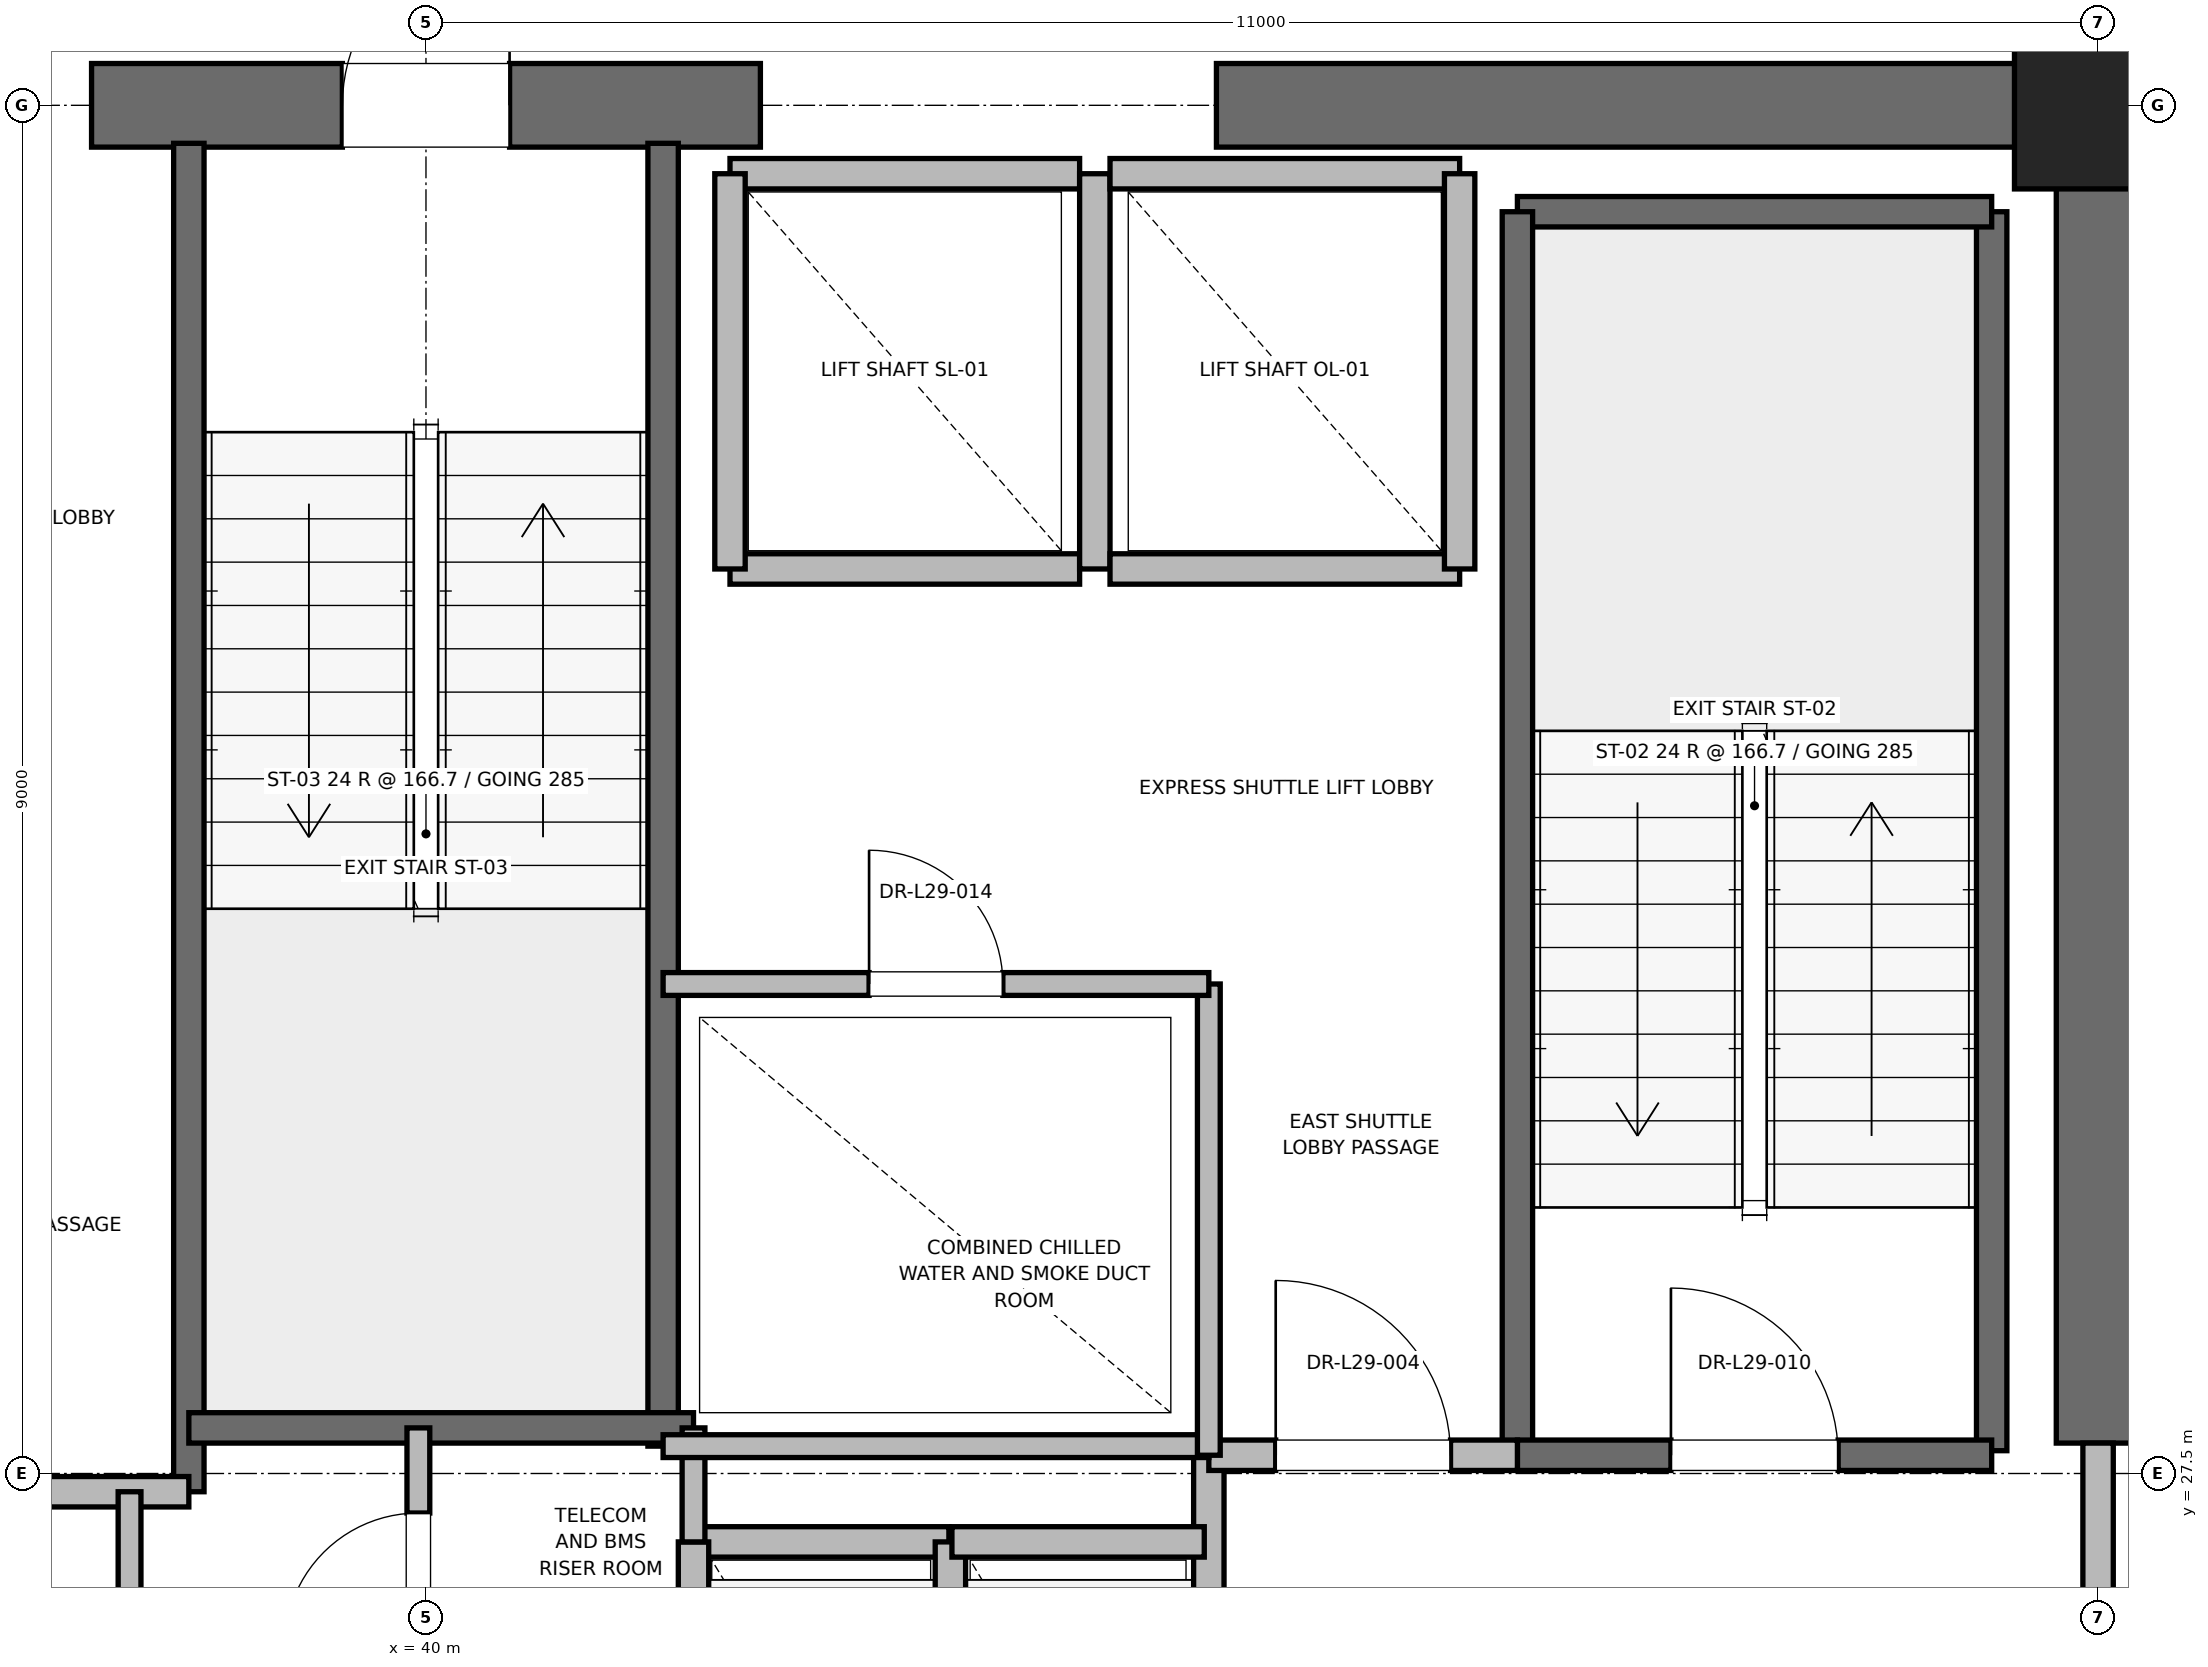
"""IFC4 building model, lengths in metres.
Left out: names, types, materials, properties, quantities, classifications, styles, units other than length and angle.
Written with IfcOpenShell. Run it as: python <this file> out.ifc"""

import sys

from ifc_helpers import new_model, si_unit, direction, frame, frame_2d, origin, origin_2d, place, context, subcontext, project, spatial, rectangle, extrude, element, fill, save


model = new_model("IFC4")
c1 = context("Model", 3, precision=1e-05, world=origin(), true_north=direction((0.0, 1.0)))
c2 = subcontext(c1, "Body", "Model", "MODEL_VIEW")
j1 = project(units=[si_unit("LENGTHUNIT", "METRE"), si_unit("PLANEANGLEUNIT", "RADIAN")], contexts=[c1])
p1 = place(None, origin())
s1 = spatial("IfcSite", under=j1, at=p1, CompositionType="ELEMENT")
p2 = place(p1, origin())
s2 = spatial("IfcBuilding", under=s1, at=p2, CompositionType="ELEMENT")
p3 = place(p2, frame((0.0, 0.0, 128.4)))
s3 = spatial("IfcBuildingStorey", under=s2, at=p3, CompositionType="ELEMENT", Elevation=128.4)
p4 = place(p3, frame((51.0, 36.5, 0.0), z_axis=(0.0, 0.0, 1.0), x_axis=(1.0, 0.0, 0.0)))
e1 = element("IfcColumn", 1, at=p4, inside=s3, PredefinedType="PILASTER", context=c2, shape_type="SweptSolid", body=[
    extrude(rectangle(XDim=1.1, YDim=1.1, at=origin_2d()), origin(), (0.0, 0.0, 1.0), 4.0),
])
p5 = place(p3, frame((37.8, 36.5, 0.0), z_axis=(0.0, 0.0, 1.0), x_axis=(1.0, 0.0, 0.0)))
e2 = element("IfcWall", 2, at=p5, inside=s3, PredefinedType="SHEAR", context=c2, shape_type="SweptSolid", body=[
    extrude(rectangle(XDim=4.4, YDim=0.55, at=frame_2d((2.2, 0.0))), origin(), (0.0, 0.0, 1.0), 3.775),
])
p6 = place(p5, frame((1.65, 0.0, 0.0)))
e3 = element("IfcOpeningElement", 3, at=p6, cuts=e2, PredefinedType="OPENING", context=c2, shape_type="SweptSolid", body=[
    extrude(rectangle(XDim=1.1, YDim=2.15, at=frame_2d((0.55, 1.075))), frame((0.0, 0.275, 0.0), z_axis=(0.0, -1.0, 0.0), x_axis=(1.0, 0.0, 0.0)), (0.0, 0.0, 1.0), 0.55),
])
p7 = place(p3, frame((45.2, 36.5, 0.0), z_axis=(0.0, 0.0, 1.0), x_axis=(1.0, 0.0, 0.0)))
e4 = element("IfcWall", 4, at=p7, inside=s3, PredefinedType="SHEAR", context=c2, shape_type="SweptSolid", body=[
    extrude(rectangle(XDim=5.8, YDim=0.55, at=frame_2d((2.9, 0.0))), origin(), (0.0, 0.0, 1.0), 3.775),
])
p8 = place(p3, frame((51.0, 27.7, 0.0), z_axis=(0.0, 0.0, 1.0), x_axis=(0.0, 1.0, 0.0)))
e5 = element("IfcWall", 5, at=p8, inside=s3, PredefinedType="SHEAR", context=c2, shape_type="SweptSolid", body=[
    extrude(rectangle(XDim=8.8, YDim=0.55, at=frame_2d((4.4, 0.0))), origin(), (0.0, 0.0, 1.0), 3.775),
])
p9 = place(p3, frame((50.3, 27.65, 0.0), z_axis=(0.0, 0.0, 1.0), x_axis=(0.0, 1.0, 0.0)))
e6 = element("IfcWall", 6, at=p9, inside=s3, PredefinedType="SOLIDWALL", context=c2, shape_type="SweptSolid", body=[
    extrude(rectangle(XDim=8.15, YDim=0.2, at=frame_2d((4.075, 0.0))), origin(), (0.0, 0.0, 1.0), 3.775),
])
p10 = place(p3, frame((47.18, 35.8, 0.0), z_axis=(0.0, 0.0, 1.0), x_axis=(1.0, 0.0, 0.0)))
e7 = element("IfcWall", 7, at=p10, inside=s3, PredefinedType="SOLIDWALL", context=c2, shape_type="SweptSolid", body=[
    extrude(rectangle(XDim=3.12, YDim=0.2, at=frame_2d((1.56, 0.0))), origin(), (0.0, 0.0, 1.0), 3.775),
])
p11 = place(p3, frame((47.18, 27.62, 0.0), z_axis=(0.0, 0.0, 1.0), x_axis=(0.0, 1.0, 0.0)))
e8 = element("IfcWall", 8, at=p11, inside=s3, PredefinedType="SOLIDWALL", context=c2, shape_type="SweptSolid", body=[
    extrude(rectangle(XDim=8.18, YDim=0.2, at=frame_2d((4.09, 0.0))), origin(), (0.0, 0.0, 1.0), 3.775),
])
p12 = place(p3, frame((47.18, 27.62, 0.0), z_axis=(0.0, 0.0, 1.0), x_axis=(1.0, 0.0, 0.0)))
e9 = element("IfcWall", 9, at=p12, inside=s3, PredefinedType="SOLIDWALL", context=c2, shape_type="SweptSolid", body=[
    extrude(rectangle(XDim=3.12, YDim=0.2, at=frame_2d((1.56, 0.0))), origin(), (0.0, 0.0, 1.0), 3.775),
])
p13 = place(p12, frame((1.01, 0.0, 0.0)))
e10 = element("IfcOpeningElement", 10, at=p13, cuts=e9, PredefinedType="OPENING", context=c2, shape_type="SweptSolid", body=[
    extrude(rectangle(XDim=1.1, YDim=2.15, at=frame_2d((0.55, 1.075))), frame((0.0, 0.1, 0.0), z_axis=(0.0, -1.0, 0.0), x_axis=(1.0, 0.0, 0.0)), (0.0, 0.0, 1.0), 0.2),
])
p14 = place(p3, frame((38.44, 27.38, 0.0), z_axis=(0.0, 0.0, 1.0), x_axis=(0.0, 1.0, 0.0)))
e11 = element("IfcWall", 11, at=p14, inside=s3, PredefinedType="SOLIDWALL", context=c2, shape_type="SweptSolid", body=[
    extrude(rectangle(XDim=8.87, YDim=0.2, at=frame_2d((4.435, 0.0))), origin(), (0.0, 0.0, 1.0), 3.775),
])
p15 = place(p3, frame((41.56, 27.68, 0.0), z_axis=(0.0, 0.0, 1.0), x_axis=(0.0, 1.0, 0.0)))
e12 = element("IfcWall", 12, at=p15, inside=s3, PredefinedType="SOLIDWALL", context=c2, shape_type="SweptSolid", body=[
    extrude(rectangle(XDim=8.57, YDim=0.2, at=frame_2d((4.285, 0.0))), origin(), (0.0, 0.0, 1.0), 3.775),
])
p16 = place(p3, frame((38.44, 27.8, 0.0), z_axis=(0.0, 0.0, 1.0), x_axis=(1.0, 0.0, 0.0)))
e13 = element("IfcWall", 13, at=p16, inside=s3, PredefinedType="SOLIDWALL", context=c2, shape_type="SweptSolid", body=[
    extrude(rectangle(XDim=3.32, YDim=0.2, at=frame_2d((1.66, 0.0))), origin(), (0.0, 0.0, 1.0), 3.775),
])
p17 = place(p3, frame((32.82, 27.38, 0.0), z_axis=(0.0, 0.0, 1.0), x_axis=(1.0, 0.0, 0.0)))
e14 = element("IfcWall", 14, at=p17, inside=s3, PredefinedType="PARTITIONING", context=c2, shape_type="SweptSolid", body=[
    extrude(rectangle(XDim=5.62, YDim=0.2, at=frame_2d((2.81, 0.0))), origin(), (0.0, 0.0, 1.0), 3.775),
])
p18 = place(p3, frame((45.15, 24.25, 0.0), z_axis=(0.0, 0.0, 1.0), x_axis=(0.0, 1.0, 0.0)))
e15 = element("IfcWall", 15, at=p18, inside=s3, PredefinedType="PARTITIONING", context=c2, shape_type="SweptSolid", body=[
    extrude(rectangle(XDim=3.37, YDim=0.2, at=frame_2d((1.685, 0.0))), origin(), (0.0, 0.0, 1.0), 3.775),
])
p19 = place(p3, frame((45.15, 27.62, 0.0), z_axis=(0.0, 0.0, 1.0), x_axis=(1.0, 0.0, 0.0)))
e16 = element("IfcWall", 16, at=p19, inside=s3, PredefinedType="PARTITIONING", context=c2, shape_type="SweptSolid", body=[
    extrude(rectangle(XDim=2.03, YDim=0.2, at=frame_2d((1.015, 0.0))), origin(), (0.0, 0.0, 1.0), 3.775),
])
p20 = place(p19, frame((0.44, 0.0, 0.0)))
e17 = element("IfcOpeningElement", 17, at=p20, cuts=e16, PredefinedType="OPENING", context=c2, shape_type="SweptSolid", body=[
    extrude(rectangle(XDim=1.15, YDim=2.2, at=frame_2d((0.575, 1.1))), frame((0.0, 0.1, 0.0), z_axis=(0.0, -1.0, 0.0), x_axis=(1.0, 0.0, 0.0)), (0.0, 0.0, 1.0), 0.2),
])
p21 = place(p3, frame((51.0, 24.3, 0.0), z_axis=(0.0, 0.0, 1.0), x_axis=(0.0, 1.0, 0.0)))
e18 = element("IfcWall", 18, at=p21, inside=s3, PredefinedType="PARTITIONING", context=c2, shape_type="SweptSolid", body=[
    extrude(rectangle(XDim=3.4, YDim=0.2, at=frame_2d((1.7, 0.0))), origin(), (0.0, 0.0, 1.0), 2.755),
])
p22 = place(p21, frame((1.125, 0.0, 0.0)))
e19 = element("IfcOpeningElement", 19, at=p22, cuts=e18, PredefinedType="OPENING", context=c2, shape_type="SweptSolid", body=[
    extrude(rectangle(XDim=1.15, YDim=2.2, at=frame_2d((0.575, 1.1))), frame((0.0, 0.1, 0.0), z_axis=(0.0, -1.0, 0.0), x_axis=(1.0, 0.0, 0.0)), (0.0, 0.0, 1.0), 0.2),
])
p23 = place(p3, frame((43.44, 27.05, 0.0), z_axis=(0.0, 0.0, 1.0), x_axis=(-1.0, 0.0, 0.0)))
e20 = element("IfcWall", 20, at=p23, inside=s3, PredefinedType="SOLIDWALL", context=c2, shape_type="SweptSolid", body=[
    extrude(rectangle(XDim=1.68, YDim=0.2, at=frame_2d((0.84, 0.0))), origin(), (0.0, 0.0, 1.0), 3.775),
])
for number, where, z_axis, x_axis in (
    (21, (41.76, 27.05, 0.0), (0.0, 0.0, 1.0), (0.0, -1.0, 0.0)),
    (22, (43.45, 24.45, 0.0), (0.0, 0.0, 1.0), (0.0, 1.0, 0.0)),
):
    element("IfcWall", number, at=place(p3, frame(where, z_axis=z_axis, x_axis=x_axis)), inside=s3, PredefinedType="SOLIDWALL", context=c2, shape_type="SweptSolid", body=[
        extrude(rectangle(XDim=2.6, YDim=0.2, at=frame_2d((1.3, 0.0))), origin(), (0.0, 0.0, 1.0), 3.775),
    ])
p24 = place(p3, frame((45.12, 27.05, 0.0), z_axis=(0.0, 0.0, 1.0), x_axis=(-1.0, 0.0, 0.0)))
e23 = element("IfcWall", 23, at=p24, inside=s3, PredefinedType="SOLIDWALL", context=c2, shape_type="SweptSolid", body=[
    extrude(rectangle(XDim=1.66, YDim=0.2, at=frame_2d((0.83, 0.0))), origin(), (0.0, 0.0, 1.0), 3.775),
])
p25 = place(p3, frame((42.0, 33.45, 0.0), z_axis=(0.0, 0.0, 1.0), x_axis=(1.0, 0.0, 0.0)))
e24 = element("IfcWall", 24, at=p25, inside=s3, PredefinedType="SOLIDWALL", context=c2, shape_type="SweptSolid", body=[
    extrude(rectangle(XDim=2.3, YDim=0.2, at=frame_2d((1.15, 0.0))), origin(), (0.0, 0.0, 1.0), 3.775),
])
p26 = place(p3, frame((44.3, 36.05, 0.0), z_axis=(0.0, 0.0, 1.0), x_axis=(-1.0, 0.0, 0.0)))
e25 = element("IfcWall", 25, at=p26, inside=s3, PredefinedType="SOLIDWALL", context=c2, shape_type="SweptSolid", body=[
    extrude(rectangle(XDim=2.3, YDim=0.2, at=frame_2d((1.15, 0.0))), origin(), (0.0, 0.0, 1.0), 2.755),
])
for number, where, z_axis, x_axis in (
    (26, (42.0, 36.05, 0.0), (0.0, 0.0, 1.0), (0.0, -1.0, 0.0)),
    (27, (44.4, 33.45, 0.0), (0.0, 0.0, 1.0), (0.0, 1.0, 0.0)),
):
    element("IfcWall", number, at=place(p3, frame(where, z_axis=z_axis, x_axis=x_axis)), inside=s3, PredefinedType="SOLIDWALL", context=c2, shape_type="SweptSolid", body=[
        extrude(rectangle(XDim=2.6, YDim=0.2, at=frame_2d((1.3, 0.0))), origin(), (0.0, 0.0, 1.0), 2.755),
    ])
p27 = place(p3, frame((44.5, 33.45, 0.0), z_axis=(0.0, 0.0, 1.0), x_axis=(1.0, 0.0, 0.0)))
e28 = element("IfcWall", 28, at=p27, inside=s3, PredefinedType="SOLIDWALL", context=c2, shape_type="SweptSolid", body=[
    extrude(rectangle(XDim=2.3, YDim=0.2, at=frame_2d((1.15, 0.0))), origin(), (0.0, 0.0, 1.0), 3.775),
])
p28 = place(p3, frame((46.8, 36.05, 0.0), z_axis=(0.0, 0.0, 1.0), x_axis=(-1.0, 0.0, 0.0)))
e29 = element("IfcWall", 29, at=p28, inside=s3, PredefinedType="SOLIDWALL", context=c2, shape_type="SweptSolid", body=[
    extrude(rectangle(XDim=2.3, YDim=0.2, at=frame_2d((1.15, 0.0))), origin(), (0.0, 0.0, 1.0), 2.755),
])
p29 = place(p3, frame((46.8, 33.45, 0.0), z_axis=(0.0, 0.0, 1.0), x_axis=(0.0, 1.0, 0.0)))
e30 = element("IfcWall", 30, at=p29, inside=s3, PredefinedType="SOLIDWALL", context=c2, shape_type="SweptSolid", body=[
    extrude(rectangle(XDim=2.6, YDim=0.2, at=frame_2d((1.3, 0.0))), origin(), (0.0, 0.0, 1.0), 3.775),
])
p30 = place(p3, frame((41.76, 27.05, 0.0), z_axis=(0.0, 0.0, 1.0), x_axis=(0.0, 1.0, 0.0)))
e31 = element("IfcWall", 31, at=p30, inside=s3, PredefinedType="PARTITIONING", context=c2, shape_type="SweptSolid", body=[
    extrude(rectangle(XDim=0.75, YDim=0.15, at=frame_2d((0.375, 0.0))), origin(), (0.0, 0.0, 1.0), 2.85),
])
p31 = place(p3, frame((39.95, 25.8, 0.0), z_axis=(0.0, 0.0, 1.0), x_axis=(0.0, 1.0, 0.0)))
e32 = element("IfcWall", 32, at=p31, inside=s3, PredefinedType="PARTITIONING", context=c2, shape_type="SweptSolid", body=[
    extrude(rectangle(XDim=2.0, YDim=0.15, at=frame_2d((1.0, 0.0))), origin(), (0.0, 0.0, 1.0), 2.85),
])
p32 = place(p31, frame((0.56, 0.0, 0.0)))
e33 = element("IfcOpeningElement", 33, at=p32, cuts=e32, PredefinedType="OPENING", context=c2, shape_type="SweptSolid", body=[
    extrude(rectangle(XDim=0.88, YDim=2.1, at=frame_2d((0.44, 1.05))), frame((0.0, 0.075, 0.0), z_axis=(0.0, -1.0, 0.0), x_axis=(1.0, 0.0, 0.0)), (0.0, 0.0, 1.0), 0.15),
])
p33 = place(p3, frame((38.05, 18.6, 0.0), z_axis=(0.0, 0.0, 1.0), x_axis=(0.0, 1.0, 0.0)))
e34 = element("IfcWall", 34, at=p33, inside=s3, PredefinedType="PARTITIONING", context=c2, shape_type="SweptSolid", body=[
    extrude(rectangle(XDim=8.78, YDim=0.15, at=frame_2d((4.39, 0.0))), origin(), (0.0, 0.0, 1.0), 2.755),
])
p34 = place(p33, frame((3.89, 0.0, 0.0)))
e35 = element("IfcOpeningElement", 35, at=p34, cuts=e34, PredefinedType="OPENING", context=c2, shape_type="SweptSolid", body=[
    extrude(rectangle(XDim=1.0, YDim=2.15, at=frame_2d((0.5, 1.075))), frame((0.0, 0.075, 0.0), z_axis=(0.0, -1.0, 0.0), x_axis=(1.0, 0.0, 0.0)), (0.0, 0.0, 1.0), 0.15),
])
p35 = place(p3, frame((41.56, 27.68, 0.0), z_axis=(0.0, 0.0, 1.0), x_axis=(1.0, 0.0, 0.0)))
e36 = element("IfcWall", 36, at=p35, inside=s3, PredefinedType="PARTITIONING", context=c2, shape_type="SweptSolid", body=[
    extrude(rectangle(XDim=3.59, YDim=0.15, at=frame_2d((1.795, 0.0))), origin(), (0.0, 0.0, 1.0), 2.85),
])
p36 = place(p3, frame((45.15, 27.62, 0.0), z_axis=(0.0, 0.0, 1.0), x_axis=(0.0, 1.0, 0.0)))
e37 = element("IfcWall", 37, at=p36, inside=s3, PredefinedType="PARTITIONING", context=c2, shape_type="SweptSolid", body=[
    extrude(rectangle(XDim=3.1, YDim=0.15, at=frame_2d((1.55, 0.0))), origin(), (0.0, 0.0, 1.0), 2.85),
])
p37 = place(p3, frame((41.56, 30.72, 0.0), z_axis=(0.0, 0.0, 1.0), x_axis=(1.0, 0.0, 0.0)))
e38 = element("IfcWall", 38, at=p37, inside=s3, PredefinedType="PARTITIONING", context=c2, shape_type="SweptSolid", body=[
    extrude(rectangle(XDim=3.59, YDim=0.15, at=frame_2d((1.795, 0.0))), origin(), (0.0, 0.0, 1.0), 2.85),
])
p38 = place(p37, frame((1.355, 0.0, 0.0)))
e39 = element("IfcOpeningElement", 39, at=p38, cuts=e38, PredefinedType="OPENING", context=c2, shape_type="SweptSolid", body=[
    extrude(rectangle(XDim=0.88, YDim=2.1, at=frame_2d((0.44, 1.05))), frame((0.0, 0.075, 0.0), z_axis=(0.0, -1.0, 0.0), x_axis=(1.0, 0.0, 0.0)), (0.0, 0.0, 1.0), 0.15),
])
p39 = place(p13, origin())
e40 = element("IfcDoor", 40, at=p39, inside=s3, OperationType="SINGLE_SWING_LEFT", PredefinedType="DOOR", context=c2, shape_type="SweptSolid", body=[
    extrude(rectangle(XDim=1.1, YDim=2.15, at=frame_2d((0.55, 1.075))), frame((0.0, 0.025, 0.0), z_axis=(0.0, -1.0, 0.0), x_axis=(1.0, 0.0, 0.0)), (0.0, 0.0, 1.0), 0.05),
])
fill(e10, e40)
p40 = place(p6, origin())
e41 = element("IfcDoor", 41, at=p40, inside=s3, OperationType="SINGLE_SWING_RIGHT", PredefinedType="DOOR", context=c2, shape_type="SweptSolid", body=[
    extrude(rectangle(XDim=1.1, YDim=2.15, at=frame_2d((0.55, 1.075))), frame((0.0, 0.025, 0.0), z_axis=(0.0, -1.0, 0.0), x_axis=(1.0, 0.0, 0.0)), (0.0, 0.0, 1.0), 0.05),
])
fill(e3, e41)
p41 = place(p20, origin())
e42 = element("IfcDoor", 42, at=p41, inside=s3, OperationType="SINGLE_SWING_LEFT", PredefinedType="DOOR", context=c2, shape_type="SweptSolid", body=[
    extrude(rectangle(XDim=1.15, YDim=2.2, at=frame_2d((0.575, 1.1))), frame((0.0, 0.025, 0.0), z_axis=(0.0, -1.0, 0.0), x_axis=(1.0, 0.0, 0.0)), (0.0, 0.0, 1.0), 0.05),
])
fill(e17, e42)
p42 = place(p32, origin())
e43 = element("IfcDoor", 43, at=p42, inside=s3, OperationType="SINGLE_SWING_LEFT", PredefinedType="DOOR", context=c2, shape_type="SweptSolid", body=[
    extrude(rectangle(XDim=0.88, YDim=2.1, at=frame_2d((0.44, 1.05))), frame((0.0, 0.025, 0.0), z_axis=(0.0, -1.0, 0.0), x_axis=(1.0, 0.0, 0.0)), (0.0, 0.0, 1.0), 0.05),
])
fill(e33, e43)
p43 = place(p38, origin())
e44 = element("IfcDoor", 44, at=p43, inside=s3, OperationType="SINGLE_SWING_LEFT", PredefinedType="DOOR", context=c2, shape_type="SweptSolid", body=[
    extrude(rectangle(XDim=0.88, YDim=2.1, at=frame_2d((0.44, 1.05))), frame((0.0, 0.025, 0.0), z_axis=(0.0, -1.0, 0.0), x_axis=(1.0, 0.0, 0.0)), (0.0, 0.0, 1.0), 0.05),
])
fill(e39, e44)
save(model, sys.argv[1])
